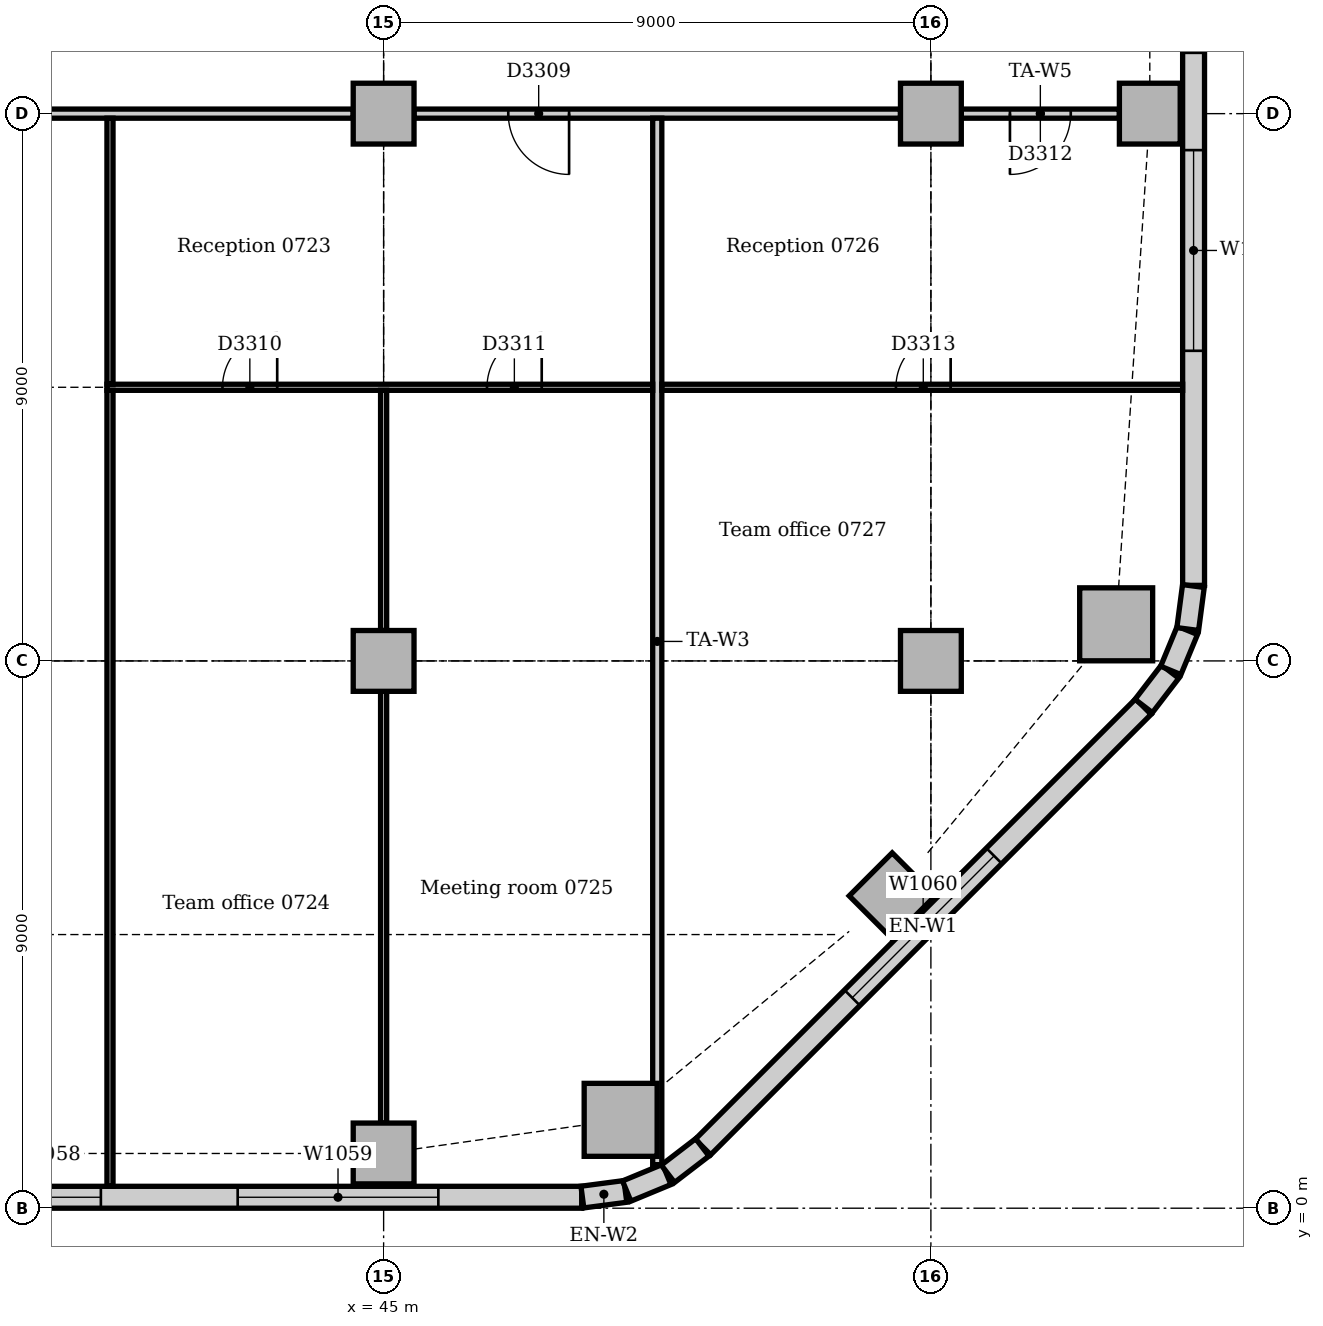
"""IFC4 building model, lengths in metres.
Left out: names, types, materials, properties, quantities, classifications, styles, units other than length and angle.
Written with IfcOpenShell. Run it as: python <this file> out.ifc"""

import sys

from ifc_helpers import new_model, si_unit, direction, frame, frame_2d, origin, origin_2d, place, context, subcontext, project, spatial, rectangle, extrude, element, fill, save


model = new_model("IFC4")
c1 = context("Model", 3, precision=1e-05, world=origin(), true_north=direction((0.0, 1.0)))
c2 = subcontext(c1, "Body", "Model", "MODEL_VIEW")
j1 = project(units=[si_unit("LENGTHUNIT", "METRE"), si_unit("PLANEANGLEUNIT", "RADIAN")], contexts=[c1])
p1 = place(None, origin())
s1 = spatial("IfcSite", under=j1, at=p1, CompositionType="ELEMENT")
p2 = place(p1, origin())
s2 = spatial("IfcBuilding", under=s1, at=p2, CompositionType="ELEMENT")
p3 = place(p2, frame((0.0, 0.0, 34.0)))
s3 = spatial("IfcBuildingStorey", under=s2, at=p3, CompositionType="ELEMENT", Elevation=34.0)
for number, where, z_axis, x_axis in (
    (1, (48.898, 1.453, 0.0), (0.0, 0.0, 1.0), (1.0, 0.0, 0.0)),
    (2, (57.047, 9.602, 0.0), (0.0, 0.0, 1.0), (1.0, 0.0, 0.0)),
):
    element("IfcColumn", number, at=place(p3, frame(where, z_axis=z_axis, x_axis=x_axis)), inside=s3, PredefinedType="COLUMN", context=c2, shape_type="SweptSolid", body=[
        extrude(rectangle(XDim=1.2, YDim=1.2, at=origin_2d()), origin(), (0.0, 0.0, 1.0), 3.85),
    ])
for number, where, z_axis, x_axis in (
    (3, (45.0, 0.9, 0.0), (0.0, 0.0, 1.0), (1.0, 0.0, 0.0)),
    (4, (53.364, 5.136, 0.0), (0.0, 0.0, 1.0), (0.707, 0.707, 0.0)),
    (5, (57.6, 18.0, 0.0), (0.0, 0.0, 1.0), (1.0, 0.0, 0.0)),
    (6, (45.0, 9.0, 0.0), (0.0, 0.0, 1.0), (1.0, 0.0, 0.0)),
    (7, (45.0, 18.0, 0.0), (0.0, 0.0, 1.0), (1.0, 0.0, 0.0)),
    (8, (54.0, 9.0, 0.0), (0.0, 0.0, 1.0), (1.0, 0.0, 0.0)),
    (9, (54.0, 18.0, 0.0), (0.0, 0.0, 1.0), (1.0, 0.0, 0.0)),
):
    element("IfcColumn", number, at=place(p3, frame(where, z_axis=z_axis, x_axis=x_axis)), inside=s3, PredefinedType="COLUMN", context=c2, shape_type="SweptSolid", body=[
        extrude(rectangle(XDim=1.0, YDim=1.0, at=origin_2d()), origin(), (0.0, 0.0, 1.0), 3.85),
    ])
p4 = place(p3, frame((4.243, 0.18, 0.0), z_axis=(0.0, 0.0, 1.0), x_axis=(1.0, 0.0, 0.0)))
e10 = element("IfcWall", 10, at=p4, inside=s3, PredefinedType="STANDARD", context=c2, shape_type="SweptSolid", body=[
    extrude(rectangle(XDim=44.015, YDim=0.36, at=frame_2d((22.007, 0.0))), origin(), (0.0, 0.0, 1.0), 3.85),
])
p5 = place(p4, frame((2.357, 0.0, 0.9)))
e11 = element("IfcOpeningElement", 11, at=p5, cuts=e10, PredefinedType="OPENING", context=c2, shape_type="SweptSolid", body=[
    extrude(rectangle(XDim=3.3, YDim=1.6, at=frame_2d((1.65, 0.8))), frame((0.0, 0.19, 0.0), z_axis=(0.0, -1.0, 0.0), x_axis=(1.0, 0.0, 0.0)), (0.0, 0.0, 1.0), 0.38),
])
p6 = place(p4, frame((7.307, 0.0, 0.9)))
e12 = element("IfcOpeningElement", 12, at=p6, cuts=e10, PredefinedType="OPENING", context=c2, shape_type="SweptSolid", body=[
    extrude(rectangle(XDim=1.8, YDim=1.6, at=frame_2d((0.9, 0.8))), frame((0.0, 0.19, 0.0), z_axis=(0.0, -1.0, 0.0), x_axis=(1.0, 0.0, 0.0)), (0.0, 0.0, 1.0), 0.38),
])
p7 = place(p4, frame((11.357, 0.0, 0.9)))
e13 = element("IfcOpeningElement", 13, at=p7, cuts=e10, PredefinedType="OPENING", context=c2, shape_type="SweptSolid", body=[
    extrude(rectangle(XDim=3.3, YDim=1.6, at=frame_2d((1.65, 0.8))), frame((0.0, 0.19, 0.0), z_axis=(0.0, -1.0, 0.0), x_axis=(1.0, 0.0, 0.0)), (0.0, 0.0, 1.0), 0.38),
])
p8 = place(p4, frame((15.857, 0.0, 0.9)))
e14 = element("IfcOpeningElement", 14, at=p8, cuts=e10, PredefinedType="OPENING", context=c2, shape_type="SweptSolid", body=[
    extrude(rectangle(XDim=3.3, YDim=1.6, at=frame_2d((1.65, 0.8))), frame((0.0, 0.19, 0.0), z_axis=(0.0, -1.0, 0.0), x_axis=(1.0, 0.0, 0.0)), (0.0, 0.0, 1.0), 0.38),
])
p9 = place(p4, frame((20.357, 0.0, 0.9)))
e15 = element("IfcOpeningElement", 15, at=p9, cuts=e10, PredefinedType="OPENING", context=c2, shape_type="SweptSolid", body=[
    extrude(rectangle(XDim=3.3, YDim=1.6, at=frame_2d((1.65, 0.8))), frame((0.0, 0.19, 0.0), z_axis=(0.0, -1.0, 0.0), x_axis=(1.0, 0.0, 0.0)), (0.0, 0.0, 1.0), 0.38),
])
p10 = place(p4, frame((25.307, 0.0, 0.9)))
e16 = element("IfcOpeningElement", 16, at=p10, cuts=e10, PredefinedType="OPENING", context=c2, shape_type="SweptSolid", body=[
    extrude(rectangle(XDim=1.8, YDim=1.6, at=frame_2d((0.9, 0.8))), frame((0.0, 0.19, 0.0), z_axis=(0.0, -1.0, 0.0), x_axis=(1.0, 0.0, 0.0)), (0.0, 0.0, 1.0), 0.38),
])
p11 = place(p4, frame((29.357, 0.0, 0.9)))
e17 = element("IfcOpeningElement", 17, at=p11, cuts=e10, PredefinedType="OPENING", context=c2, shape_type="SweptSolid", body=[
    extrude(rectangle(XDim=3.3, YDim=1.6, at=frame_2d((1.65, 0.8))), frame((0.0, 0.19, 0.0), z_axis=(0.0, -1.0, 0.0), x_axis=(1.0, 0.0, 0.0)), (0.0, 0.0, 1.0), 0.38),
])
p12 = place(p4, frame((34.307, 0.0, 0.9)))
e18 = element("IfcOpeningElement", 18, at=p12, cuts=e10, PredefinedType="OPENING", context=c2, shape_type="SweptSolid", body=[
    extrude(rectangle(XDim=1.8, YDim=1.6, at=frame_2d((0.9, 0.8))), frame((0.0, 0.19, 0.0), z_axis=(0.0, -1.0, 0.0), x_axis=(1.0, 0.0, 0.0)), (0.0, 0.0, 1.0), 0.38),
])
p13 = place(p4, frame((38.357, 0.0, 0.9)))
e19 = element("IfcOpeningElement", 19, at=p13, cuts=e10, PredefinedType="OPENING", context=c2, shape_type="SweptSolid", body=[
    extrude(rectangle(XDim=3.3, YDim=1.6, at=frame_2d((1.65, 0.8))), frame((0.0, 0.19, 0.0), z_axis=(0.0, -1.0, 0.0), x_axis=(1.0, 0.0, 0.0)), (0.0, 0.0, 1.0), 0.38),
])
p14 = place(p3, frame((50.251, 1.006, 0.0), z_axis=(0.0, 0.0, 1.0), x_axis=(0.707106781187, 0.707106781187, 0.0)))
e20 = element("IfcWall", 20, at=p14, inside=s3, PredefinedType="STANDARD", context=c2, shape_type="SweptSolid", body=[
    extrude(rectangle(XDim=10.243, YDim=0.36, at=frame_2d((5.121, 0.0))), origin(), (0.0, 0.0, 1.0), 3.85),
])
p15 = place(p14, frame((3.471, 0.0, 0.9)))
e21 = element("IfcOpeningElement", 21, at=p15, cuts=e20, PredefinedType="OPENING", context=c2, shape_type="SweptSolid", body=[
    extrude(rectangle(XDim=3.3, YDim=1.6, at=frame_2d((1.65, 0.8))), frame((0.0, 0.19, 0.0), z_axis=(0.0, -1.0, 0.0), x_axis=(1.0, 0.0, 0.0)), (0.0, 0.0, 1.0), 0.38),
])
p16 = place(p3, frame((58.32, 10.243, 0.0), z_axis=(0.0, 0.0, 1.0), x_axis=(0.0, 1.0, 0.0)))
e22 = element("IfcWall", 22, at=p16, inside=s3, PredefinedType="STANDARD", context=c2, shape_type="SweptSolid", body=[
    extrude(rectangle(XDim=24.515, YDim=0.36, at=frame_2d((12.257, 0.0))), origin(), (0.0, 0.0, 1.0), 3.85),
])
p17 = place(p16, frame((3.857, 0.0, 0.9)))
e23 = element("IfcOpeningElement", 23, at=p17, cuts=e22, PredefinedType="OPENING", context=c2, shape_type="SweptSolid", body=[
    extrude(rectangle(XDim=3.3, YDim=1.6, at=frame_2d((1.65, 0.8))), frame((0.0, 0.19, 0.0), z_axis=(0.0, -1.0, 0.0), x_axis=(1.0, 0.0, 0.0)), (0.0, 0.0, 1.0), 0.38),
])
p18 = place(p16, frame((8.757, 0.0, 0.9)))
e24 = element("IfcOpeningElement", 24, at=p18, cuts=e22, PredefinedType="OPENING", context=c2, shape_type="SweptSolid", body=[
    extrude(rectangle(XDim=1.8, YDim=1.6, at=frame_2d((0.9, 0.8))), frame((0.0, 0.19, 0.0), z_axis=(0.0, -1.0, 0.0), x_axis=(1.0, 0.0, 0.0)), (0.0, 0.0, 1.0), 0.38),
])
p19 = place(p16, frame((12.557, 0.0, 0.9)))
e25 = element("IfcOpeningElement", 25, at=p19, cuts=e22, PredefinedType="OPENING", context=c2, shape_type="SweptSolid", body=[
    extrude(rectangle(XDim=3.3, YDim=1.6, at=frame_2d((1.65, 0.8))), frame((0.0, 0.19, 0.0), z_axis=(0.0, -1.0, 0.0), x_axis=(1.0, 0.0, 0.0)), (0.0, 0.0, 1.0), 0.38),
])
p20 = place(p16, frame((17.357, 0.0, 0.9)))
e26 = element("IfcOpeningElement", 26, at=p20, cuts=e22, PredefinedType="OPENING", context=c2, shape_type="SweptSolid", body=[
    extrude(rectangle(XDim=3.3, YDim=1.6, at=frame_2d((1.65, 0.8))), frame((0.0, 0.19, 0.0), z_axis=(0.0, -1.0, 0.0), x_axis=(1.0, 0.0, 0.0)), (0.0, 0.0, 1.0), 0.38),
])
for number, where, z_axis, x_axis in (
    (27, (48.269, 0.183, 0.0), (0.0, 0.0, 1.0), (0.991, 0.131, 0.0)),
    (28, (48.997, 0.282, 0.0), (0.0, 0.0, 1.0), (0.924, 0.383, 0.0)),
):
    element("IfcWall", number, at=place(p3, frame(where, z_axis=z_axis, x_axis=x_axis)), inside=s3, PredefinedType="STANDARD", context=c2, shape_type="SweptSolid", body=[
        extrude(rectangle(XDim=0.713, YDim=0.36, at=frame_2d((0.356, 0.0))), origin(), (0.0, 0.0, 1.0), 3.85),
    ])
for number, where, z_axis, x_axis in (
    (29, (49.675, 0.566, 0.0), (0.0, 0.0, 1.0), (0.793, 0.609, 0.0)),
    (30, (57.5, 8.259, 0.0), (0.0, 0.0, 1.0), (0.609, 0.793, 0.0)),
):
    element("IfcWall", number, at=place(p3, frame(where, z_axis=z_axis, x_axis=x_axis)), inside=s3, PredefinedType="STANDARD", context=c2, shape_type="SweptSolid", body=[
        extrude(rectangle(XDim=0.713, YDim=0.36, at=frame_2d((0.357, 0.0))), origin(), (0.0, 0.0, 1.0), 3.85),
    ])
for number, where, z_axis, x_axis in (
    (31, (57.945, 8.844, 0.0), (0.0, 0.0, 1.0), (0.383, 0.924, 0.0)),
    (32, (58.224, 9.524, 0.0), (0.0, 0.0, 1.0), (0.131, 0.991, 0.0)),
):
    element("IfcWall", number, at=place(p3, frame(where, z_axis=z_axis, x_axis=x_axis)), inside=s3, PredefinedType="STANDARD", context=c2, shape_type="SweptSolid", body=[
        extrude(rectangle(XDim=0.713, YDim=0.36, at=frame_2d((0.356, 0.0))), origin(), (0.0, 0.0, 1.0), 3.85),
    ])
p21 = place(p3, frame((54.5, 18.0, 0.0), z_axis=(0.0, 0.0, 1.0), x_axis=(1.0, 0.0, 0.0)))
e33 = element("IfcWall", 33, at=p21, inside=s3, PredefinedType="PARTITIONING", context=c2, shape_type="SweptSolid", body=[
    extrude(rectangle(XDim=2.6, YDim=0.15, at=frame_2d((1.3, 0.0))), origin(), (0.0, 0.0, 1.0), 3.602),
])
p22 = place(p21, frame((0.8, 0.0, 0.0)))
e34 = element("IfcOpeningElement", 34, at=p22, cuts=e33, PredefinedType="OPENING", context=c2, shape_type="SweptSolid", body=[
    extrude(rectangle(XDim=1.0, YDim=2.1, at=frame_2d((0.5, 1.05))), frame((0.0, 0.085, 0.0), z_axis=(0.0, -1.0, 0.0), x_axis=(1.0, 0.0, 0.0)), (0.0, 0.0, 1.0), 0.17),
])
p23 = place(p3, frame((45.5, 18.0, 0.0), z_axis=(0.0, 0.0, 1.0), x_axis=(1.0, 0.0, 0.0)))
e35 = element("IfcWall", 35, at=p23, inside=s3, PredefinedType="PARTITIONING", context=c2, shape_type="SweptSolid", body=[
    extrude(rectangle(XDim=8.0, YDim=0.15, at=frame_2d((4.0, 0.0))), origin(), (0.0, 0.0, 1.0), 3.15),
])
p24 = place(p23, frame((1.55, 0.0, 0.0)))
e36 = element("IfcOpeningElement", 36, at=p24, cuts=e35, PredefinedType="OPENING", context=c2, shape_type="SweptSolid", body=[
    extrude(rectangle(XDim=1.0, YDim=2.1, at=frame_2d((0.5, 1.05))), frame((0.0, 0.085, 0.0), z_axis=(0.0, -1.0, 0.0), x_axis=(1.0, 0.0, 0.0)), (0.0, 0.0, 1.0), 0.17),
])
p25 = place(p3, frame((36.5, 18.0, 0.0), z_axis=(0.0, 0.0, 1.0), x_axis=(1.0, 0.0, 0.0)))
e37 = element("IfcWall", 37, at=p25, inside=s3, PredefinedType="PARTITIONING", context=c2, shape_type="SweptSolid", body=[
    extrude(rectangle(XDim=8.0, YDim=0.15, at=frame_2d((4.0, 0.0))), origin(), (0.0, 0.0, 1.0), 3.15),
])
p26 = place(p25, frame((1.6, 0.0, 0.0)))
e38 = element("IfcOpeningElement", 38, at=p26, cuts=e37, PredefinedType="OPENING", context=c2, shape_type="SweptSolid", body=[
    extrude(rectangle(XDim=0.9, YDim=2.1, at=frame_2d((0.45, 1.05))), frame((0.0, 0.085, 0.0), z_axis=(0.0, -1.0, 0.0), x_axis=(1.0, 0.0, 0.0)), (0.0, 0.0, 1.0), 0.17),
])
p27 = place(p3, frame((49.5, 0.716, 0.0), z_axis=(0.0, 0.0, 1.0), x_axis=(0.0, 1.0, 0.0)))
e39 = element("IfcWall", 39, at=p27, inside=s3, PredefinedType="PARTITIONING", context=c2, shape_type="SweptSolid", body=[
    extrude(rectangle(XDim=17.209, YDim=0.15, at=frame_2d((8.604, 0.0))), origin(), (0.0, 0.0, 1.0), 3.85),
])
p28 = place(p3, frame((40.45, 13.5, 0.0), z_axis=(0.0, 0.0, 1.0), x_axis=(1.0, 0.0, 0.0)))
e40 = element("IfcWall", 40, at=p28, inside=s3, PredefinedType="PARTITIONING", context=c2, shape_type="SweptSolid", body=[
    extrude(rectangle(XDim=8.975, YDim=0.1, at=frame_2d((4.487, 0.0))), origin(), (0.0, 0.0, 1.0), 3.35),
])
p29 = place(p28, frame((1.9, 0.0, 0.0)))
e41 = element("IfcOpeningElement", 41, at=p29, cuts=e40, PredefinedType="OPENING", context=c2, shape_type="SweptSolid", body=[
    extrude(rectangle(XDim=0.9, YDim=2.1, at=frame_2d((0.45, 1.05))), frame((0.0, 0.06, 0.0), z_axis=(0.0, -1.0, 0.0), x_axis=(1.0, 0.0, 0.0)), (0.0, 0.0, 1.0), 0.12),
])
p30 = place(p28, frame((6.25, 0.0, 0.0)))
e42 = element("IfcOpeningElement", 42, at=p30, cuts=e40, PredefinedType="OPENING", context=c2, shape_type="SweptSolid", body=[
    extrude(rectangle(XDim=0.9, YDim=2.1, at=frame_2d((0.45, 1.05))), frame((0.0, 0.06, 0.0), z_axis=(0.0, -1.0, 0.0), x_axis=(1.0, 0.0, 0.0)), (0.0, 0.0, 1.0), 0.12),
])
p31 = place(p3, frame((49.575, 13.5, 0.0), z_axis=(0.0, 0.0, 1.0), x_axis=(1.0, 0.0, 0.0)))
e43 = element("IfcWall", 43, at=p31, inside=s3, PredefinedType="PARTITIONING", context=c2, shape_type="SweptSolid", body=[
    extrude(rectangle(XDim=8.565, YDim=0.1, at=frame_2d((4.282, 0.0))), origin(), (0.0, 0.0, 1.0), 3.35),
])
p32 = place(p31, frame((3.85, 0.0, 0.0)))
e44 = element("IfcOpeningElement", 44, at=p32, cuts=e43, PredefinedType="OPENING", context=c2, shape_type="SweptSolid", body=[
    extrude(rectangle(XDim=0.9, YDim=2.1, at=frame_2d((0.45, 1.05))), frame((0.0, 0.06, 0.0), z_axis=(0.0, -1.0, 0.0), x_axis=(1.0, 0.0, 0.0)), (0.0, 0.0, 1.0), 0.12),
])
p33 = place(p3, frame((40.5, 13.55, 0.0), z_axis=(0.0, 0.0, 1.0), x_axis=(0.0, 1.0, 0.0)))
e45 = element("IfcWall", 45, at=p33, inside=s3, PredefinedType="PARTITIONING", context=c2, shape_type="SweptSolid", body=[
    extrude(rectangle(XDim=4.375, YDim=0.1, at=frame_2d((2.188, 0.0))), origin(), (0.0, 0.0, 1.0), 3.85),
])
p34 = place(p3, frame((40.5, 0.36, 0.0), z_axis=(0.0, 0.0, 1.0), x_axis=(0.0, 1.0, 0.0)))
e46 = element("IfcWall", 46, at=p34, inside=s3, PredefinedType="PARTITIONING", context=c2, shape_type="SweptSolid", body=[
    extrude(rectangle(XDim=13.09, YDim=0.1, at=frame_2d((6.545, 0.0))), origin(), (0.0, 0.0, 1.0), 3.85),
])
p35 = place(p3, frame((45.0, 1.4, 0.0), z_axis=(0.0, 0.0, 1.0), x_axis=(0.0, 1.0, 0.0)))
e47 = element("IfcWall", 47, at=p35, inside=s3, PredefinedType="PARTITIONING", context=c2, shape_type="SweptSolid", body=[
    extrude(rectangle(XDim=7.1, YDim=0.1, at=frame_2d((3.55, 0.0))), origin(), (0.0, 0.0, 1.0), 3.158),
])
p36 = place(p3, frame((45.0, 9.5, 0.0), z_axis=(0.0, 0.0, 1.0), x_axis=(0.0, 1.0, 0.0)))
e48 = element("IfcWall", 48, at=p36, inside=s3, PredefinedType="PARTITIONING", context=c2, shape_type="SweptSolid", body=[
    extrude(rectangle(XDim=3.95, YDim=0.1, at=frame_2d((1.975, 0.0))), origin(), (0.0, 0.0, 1.0), 3.158),
])
p37 = place(p12, origin())
e49 = element("IfcWindow", 49, at=p37, inside=s3, PartitioningType="SINGLE_PANEL", PredefinedType="WINDOW", context=c2, shape_type="SweptSolid", body=[
    extrude(rectangle(XDim=1.8, YDim=1.6, at=frame_2d((0.9, 0.8))), frame((0.0, 0.13, 0.0), z_axis=(0.0, -1.0, 0.0), x_axis=(1.0, 0.0, 0.0)), (0.0, 0.0, 1.0), 0.06),
])
fill(e18, e49)
p38 = place(p13, origin())
e50 = element("IfcWindow", 50, at=p38, inside=s3, PartitioningType="SINGLE_PANEL", PredefinedType="WINDOW", context=c2, shape_type="SweptSolid", body=[
    extrude(rectangle(XDim=3.3, YDim=1.6, at=frame_2d((1.65, 0.8))), frame((0.0, 0.13, 0.0), z_axis=(0.0, -1.0, 0.0), x_axis=(1.0, 0.0, 0.0)), (0.0, 0.0, 1.0), 0.06),
])
fill(e19, e50)
p39 = place(p15, origin())
e51 = element("IfcWindow", 51, at=p39, inside=s3, PartitioningType="SINGLE_PANEL", PredefinedType="WINDOW", context=c2, shape_type="SweptSolid", body=[
    extrude(rectangle(XDim=3.3, YDim=1.6, at=frame_2d((1.65, 0.8))), frame((0.0, 0.13, 0.0), z_axis=(0.0, -1.0, 0.0), x_axis=(1.0, 0.0, 0.0)), (0.0, 0.0, 1.0), 0.06),
])
fill(e21, e51)
p40 = place(p17, origin())
e52 = element("IfcWindow", 52, at=p40, inside=s3, PartitioningType="SINGLE_PANEL", PredefinedType="WINDOW", context=c2, shape_type="SweptSolid", body=[
    extrude(rectangle(XDim=3.3, YDim=1.6, at=frame_2d((1.65, 0.8))), frame((0.0, 0.13, 0.0), z_axis=(0.0, -1.0, 0.0), x_axis=(1.0, 0.0, 0.0)), (0.0, 0.0, 1.0), 0.06),
])
fill(e23, e52)
p41 = place(p24, frame((1.0, 0.0, 0.0), z_axis=(0.0, 0.0, 1.0), x_axis=(-1.0, 0.0, 0.0)))
e53 = element("IfcDoor", 53, at=p41, inside=s3, OperationType="SINGLE_SWING_LEFT", PredefinedType="DOOR", context=c2, shape_type="SweptSolid", body=[
    extrude(rectangle(XDim=1.0, YDim=2.1, at=frame_2d((0.5, 1.05))), frame((0.0, 0.025, 0.0), z_axis=(0.0, -1.0, 0.0), x_axis=(1.0, 0.0, 0.0)), (0.0, 0.0, 1.0), 0.05),
])
fill(e36, e53)
p42 = place(p29, origin())
e54 = element("IfcDoor", 54, at=p42, inside=s3, OperationType="SINGLE_SWING_RIGHT", PredefinedType="DOOR", context=c2, shape_type="SweptSolid", body=[
    extrude(rectangle(XDim=0.9, YDim=2.1, at=frame_2d((0.45, 1.05))), frame((0.0, 0.025, 0.0), z_axis=(0.0, -1.0, 0.0), x_axis=(1.0, 0.0, 0.0)), (0.0, 0.0, 1.0), 0.05),
])
fill(e41, e54)
p43 = place(p30, origin())
e55 = element("IfcDoor", 55, at=p43, inside=s3, OperationType="SINGLE_SWING_RIGHT", PredefinedType="DOOR", context=c2, shape_type="SweptSolid", body=[
    extrude(rectangle(XDim=0.9, YDim=2.1, at=frame_2d((0.45, 1.05))), frame((0.0, 0.025, 0.0), z_axis=(0.0, -1.0, 0.0), x_axis=(1.0, 0.0, 0.0)), (0.0, 0.0, 1.0), 0.05),
])
fill(e42, e55)
p44 = place(p22, frame((1.0, 0.0, 0.0), z_axis=(0.0, 0.0, 1.0), x_axis=(-1.0, 0.0, 0.0)))
e56 = element("IfcDoor", 56, at=p44, inside=s3, OperationType="SINGLE_SWING_RIGHT", PredefinedType="DOOR", context=c2, shape_type="SweptSolid", body=[
    extrude(rectangle(XDim=1.0, YDim=2.1, at=frame_2d((0.5, 1.05))), frame((0.0, 0.025, 0.0), z_axis=(0.0, -1.0, 0.0), x_axis=(1.0, 0.0, 0.0)), (0.0, 0.0, 1.0), 0.05),
])
fill(e34, e56)
p45 = place(p32, origin())
e57 = element("IfcDoor", 57, at=p45, inside=s3, OperationType="SINGLE_SWING_RIGHT", PredefinedType="DOOR", context=c2, shape_type="SweptSolid", body=[
    extrude(rectangle(XDim=0.9, YDim=2.1, at=frame_2d((0.45, 1.05))), frame((0.0, 0.025, 0.0), z_axis=(0.0, -1.0, 0.0), x_axis=(1.0, 0.0, 0.0)), (0.0, 0.0, 1.0), 0.05),
])
fill(e44, e57)
save(model, sys.argv[1])
